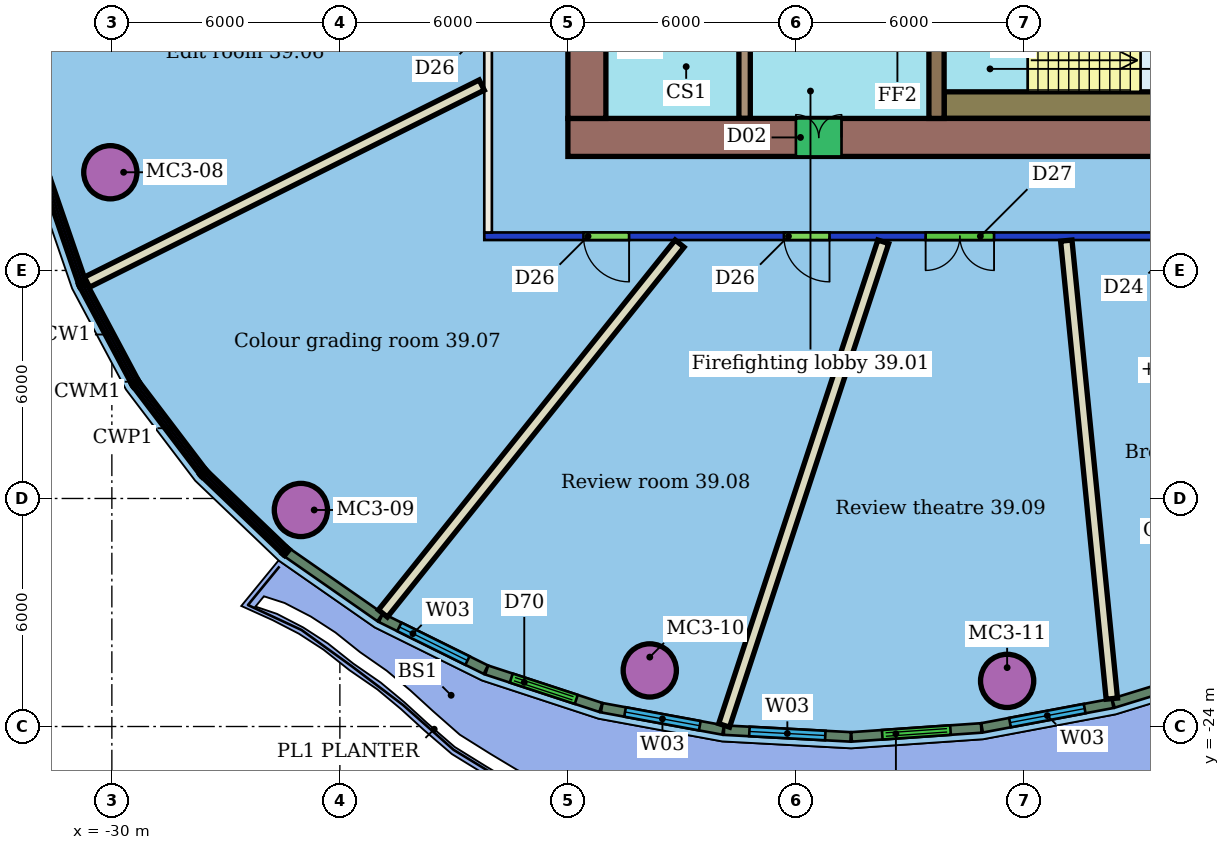
"""IFC4 building model, lengths in metres.
Left out: names, types, materials, properties, quantities, classifications, styles, units other than length and angle.
Written with IfcOpenShell. Run it as: python <this file> out.ifc"""

import sys

from ifc_helpers import new_model, si_unit, direction, frame, frame_2d, origin, origin_2d, place, context, subcontext, project, spatial, rectangle, hollow_circle, extrude, element, fill, save


model = new_model("IFC4")
c1 = context("Model", 3, precision=1e-05, world=origin(), true_north=direction((0.0, 1.0)))
c2 = subcontext(c1, "Body", "Model", "MODEL_VIEW")
j1 = project(units=[si_unit("LENGTHUNIT", "METRE"), si_unit("PLANEANGLEUNIT", "RADIAN")], contexts=[c1])
p1 = place(None, origin())
s1 = spatial("IfcSite", under=j1, at=p1, CompositionType="ELEMENT")
p2 = place(p1, origin())
s2 = spatial("IfcBuilding", under=s1, at=p2, CompositionType="ELEMENT")
p3 = place(p2, frame((0.0, 0.0, 165.0)))
s3 = spatial("IfcBuildingStorey", under=s2, at=p3, CompositionType="ELEMENT", Elevation=165.0)
for number, where, z_axis, x_axis in (
    (1, (-30.041, -9.417, 0.0), (0.0, 0.0, 1.0), (1.0, 0.0, 0.0)),
    (2, (-25.026, -18.303, 0.0), (0.0, 0.0, 1.0), (1.0, 0.0, 0.0)),
    (3, (-15.845, -22.524, 0.0), (0.0, 0.0, 1.0), (1.0, 0.0, 0.0)),
    (4, (-6.442, -22.8, 0.0), (0.0, 0.0, 1.0), (1.0, 0.0, 0.0)),
):
    element("IfcColumn", number, at=place(p3, frame(where, z_axis=z_axis, x_axis=x_axis)), inside=s3, PredefinedType="COLUMN", context=c2, shape_type="SweptSolid", body=[
        extrude(hollow_circle(Radius=0.7, WallThickness=0.05, at=origin_2d()), origin(), (0.0, 0.0, 1.0), 3.45),
    ])
p4 = place(p3, frame((8.2, -11.1, 0.0), z_axis=(0.0, 0.0, 1.0), x_axis=(-1.0, 0.0, 0.0)))
e5 = element("IfcWall", 5, at=p4, inside=s3, PredefinedType="PARTITIONING", context=c2, shape_type="SweptSolid", body=[
    extrude(rectangle(XDim=28.4, YDim=0.2, at=frame_2d((14.2, 0.0))), origin(), (0.0, 0.0, 1.0), 3.05),
])
p5 = place(p4, frame((24.59, 0.0, 0.0)))
e6 = element("IfcOpeningElement", 6, at=p5, cuts=e5, PredefinedType="OPENING", context=c2, shape_type="SweptSolid", body=[
    extrude(rectangle(XDim=1.2, YDim=2.1, at=frame_2d((0.6, 1.05))), frame((0.0, 0.11, 0.0), z_axis=(0.0, -1.0, 0.0), x_axis=(1.0, 0.0, 0.0)), (0.0, 0.0, 1.0), 0.22),
])
p6 = place(p4, frame((19.316, 0.0, 0.0)))
e7 = element("IfcOpeningElement", 7, at=p6, cuts=e5, PredefinedType="OPENING", context=c2, shape_type="SweptSolid", body=[
    extrude(rectangle(XDim=1.2, YDim=2.1, at=frame_2d((0.6, 1.05))), frame((0.0, 0.11, 0.0), z_axis=(0.0, -1.0, 0.0), x_axis=(1.0, 0.0, 0.0)), (0.0, 0.0, 1.0), 0.22),
])
p7 = place(p4, frame((14.986, 0.0, 0.0)))
e8 = element("IfcOpeningElement", 8, at=p7, cuts=e5, PredefinedType="OPENING", context=c2, shape_type="SweptSolid", body=[
    extrude(rectangle(XDim=1.8, YDim=2.4, at=frame_2d((0.9, 1.2))), frame((0.0, 0.11, 0.0), z_axis=(0.0, -1.0, 0.0), x_axis=(1.0, 0.0, 0.0)), (0.0, 0.0, 1.0), 0.22),
])
p8 = place(p4, frame((8.594, 0.0, 0.0)))
e9 = element("IfcOpeningElement", 9, at=p8, cuts=e5, PredefinedType="OPENING", context=c2, shape_type="SweptSolid", body=[
    extrude(rectangle(XDim=1.5, YDim=2.1, at=frame_2d((0.75, 1.05))), frame((0.0, 0.11, 0.0), z_axis=(0.0, -1.0, 0.0), x_axis=(1.0, 0.0, 0.0)), (0.0, 0.0, 1.0), 0.22),
])
p9 = place(p4, frame((4.011, 0.0, 0.0)))
e10 = element("IfcOpeningElement", 10, at=p9, cuts=e5, PredefinedType="OPENING", context=c2, shape_type="SweptSolid", body=[
    extrude(rectangle(XDim=1.2, YDim=2.1, at=frame_2d((0.6, 1.05))), frame((0.0, 0.11, 0.0), z_axis=(0.0, -1.0, 0.0), x_axis=(1.0, 0.0, 0.0)), (0.0, 0.0, 1.0), 0.22),
])
p10 = place(p3, frame((-20.1, -11.0, 0.0), z_axis=(0.0, 0.0, 1.0), x_axis=(0.0, 1.0, 0.0)))
e11 = element("IfcWall", 11, at=p10, inside=s3, PredefinedType="PARTITIONING", context=c2, shape_type="SweptSolid", body=[
    extrude(rectangle(XDim=22.0, YDim=0.2, at=frame_2d((11.0, 0.0))), origin(), (0.0, 0.0, 1.0), 3.45),
])
p11 = place(p10, frame((16.748, 0.0, 0.0)))
e12 = element("IfcOpeningElement", 12, at=p11, cuts=e11, PredefinedType="OPENING", context=c2, shape_type="SweptSolid", body=[
    extrude(rectangle(XDim=1.0, YDim=2.1, at=frame_2d((0.5, 1.05))), frame((0.0, 0.11, 0.0), z_axis=(0.0, -1.0, 0.0), x_axis=(1.0, 0.0, 0.0)), (0.0, 0.0, 1.0), 0.22),
])
p12 = place(p10, frame((11.959, 0.0, 0.0)))
e13 = element("IfcOpeningElement", 13, at=p12, cuts=e11, PredefinedType="OPENING", context=c2, shape_type="SweptSolid", body=[
    extrude(rectangle(XDim=1.1, YDim=2.1, at=frame_2d((0.55, 1.05))), frame((0.0, 0.11, 0.0), z_axis=(0.0, -1.0, 0.0), x_axis=(1.0, 0.0, 0.0)), (0.0, 0.0, 1.0), 0.22),
])
p13 = place(p10, frame((5.319, 0.0, 0.0)))
e14 = element("IfcOpeningElement", 14, at=p13, cuts=e11, PredefinedType="OPENING", context=c2, shape_type="SweptSolid", body=[
    extrude(rectangle(XDim=1.2, YDim=2.1, at=frame_2d((0.6, 1.05))), frame((0.0, 0.11, 0.0), z_axis=(0.0, -1.0, 0.0), x_axis=(1.0, 0.0, 0.0)), (0.0, 0.0, 1.0), 0.22),
])
p14 = place(p3, frame((-30.655, -12.308, 0.0), z_axis=(0.0, 0.0, 1.0), x_axis=(0.894708785018, 0.446649963632, 0.0)))
e15 = element("IfcWall", 15, at=p14, inside=s3, PredefinedType="PARTITIONING", context=c2, shape_type="SweptSolid", body=[
    extrude(rectangle(XDim=11.61, YDim=0.3, at=frame_2d((5.805, 0.0))), origin(), (0.0, 0.0, 1.0), 3.45),
])
p15 = place(p3, frame((-22.868, -21.025, 0.0), z_axis=(0.0, 0.0, 1.0), x_axis=(0.625768349668, 0.780008956713, 0.0)))
e16 = element("IfcWall", 16, at=p15, inside=s3, PredefinedType="PARTITIONING", context=c2, shape_type="SweptSolid", body=[
    extrude(rectangle(XDim=12.476, YDim=0.3, at=frame_2d((6.238, 0.0))), origin(), (0.0, 0.0, 1.0), 3.45),
])
p16 = place(p3, frame((-13.889, -23.97, 0.0), z_axis=(0.0, 0.0, 1.0), x_axis=(0.312622092404, 0.94987758545, 0.0)))
e17 = element("IfcWall", 17, at=p16, inside=s3, PredefinedType="PARTITIONING", context=c2, shape_type="SweptSolid", body=[
    extrude(rectangle(XDim=13.395, YDim=0.3, at=frame_2d((6.697, 0.0))), origin(), (0.0, 0.0, 1.0), 3.45),
])
p17 = place(p3, frame((-3.687, -23.267, 0.0), z_axis=(0.0, 0.0, 1.0), x_axis=(-0.098952866834, 0.995092121437, 0.0)))
e18 = element("IfcWall", 18, at=p17, inside=s3, PredefinedType="PARTITIONING", context=c2, shape_type="SweptSolid", body=[
    extrude(rectangle(XDim=12.112, YDim=0.3, at=frame_2d((6.056, 0.0))), origin(), (0.0, 0.0, 1.0), 3.45),
])
p18 = place(p3, frame((-25.378, -19.429, 0.0), z_axis=(0.0, 0.0, 1.0), x_axis=(0.820566469183, -0.571551108521, 0.0)))
e19 = element("IfcWall", 19, at=p18, inside=s3, PredefinedType="SOLIDWALL", context=c2, shape_type="SweptSolid", body=[
    extrude(rectangle(XDim=2.969, YDim=0.25, at=frame_2d((1.484, 0.0))), origin(), (0.0, 0.0, 1.0), 3.1),
])
p19 = place(p3, frame((-22.919, -21.139, 0.0), z_axis=(0.0, 0.0, 1.0), x_axis=(0.896353964816, -0.443339113725, 0.0)))
e20 = element("IfcWall", 20, at=p19, inside=s3, PredefinedType="SOLIDWALL", context=c2, shape_type="SweptSolid", body=[
    extrude(rectangle(XDim=3.078, YDim=0.25, at=frame_2d((1.539, 0.0))), origin(), (0.0, 0.0, 1.0), 3.1),
])
p20 = place(p19, frame((0.539, 0.0, 0.9)))
e21 = element("IfcOpeningElement", 21, at=p20, cuts=e20, PredefinedType="OPENING", context=c2, shape_type="SweptSolid", body=[
    extrude(rectangle(XDim=2.0, YDim=2.1, at=frame_2d((1.0, 1.05))), frame((0.0, 0.135, 0.0), z_axis=(0.0, -1.0, 0.0), x_axis=(1.0, 0.0, 0.0)), (0.0, 0.0, 1.0), 0.27),
])
p21 = place(p3, frame((-20.136, -22.514, 0.0), z_axis=(0.0, 0.0, 1.0), x_axis=(0.950163900918, -0.311750800147, 0.0)))
e22 = element("IfcWall", 22, at=p21, inside=s3, PredefinedType="SOLIDWALL", context=c2, shape_type="SweptSolid", body=[
    extrude(rectangle(XDim=3.16, YDim=0.25, at=frame_2d((1.58, 0.0))), origin(), (0.0, 0.0, 1.0), 3.1),
])
p22 = place(p21, frame((0.68, 0.0, 0.0)))
e23 = element("IfcOpeningElement", 23, at=p22, cuts=e22, PredefinedType="OPENING", context=c2, shape_type="SweptSolid", body=[
    extrude(rectangle(XDim=1.8, YDim=2.4, at=frame_2d((0.9, 1.2))), frame((0.0, 0.135, 0.0), z_axis=(0.0, -1.0, 0.0), x_axis=(1.0, 0.0, 0.0)), (0.0, 0.0, 1.0), 0.27),
])
p23 = place(p3, frame((-17.11, -23.505, 0.0), z_axis=(0.0, 0.0, 1.0), x_axis=(0.983511988616, -0.180842938067, 0.0)))
e24 = element("IfcWall", 24, at=p23, inside=s3, PredefinedType="SOLIDWALL", context=c2, shape_type="SweptSolid", body=[
    extrude(rectangle(XDim=3.248, YDim=0.25, at=frame_2d((1.624, 0.0))), origin(), (0.0, 0.0, 1.0), 3.1),
])
p24 = place(p23, frame((0.624, 0.0, 0.9)))
e25 = element("IfcOpeningElement", 25, at=p24, cuts=e24, PredefinedType="OPENING", context=c2, shape_type="SweptSolid", body=[
    extrude(rectangle(XDim=2.0, YDim=2.1, at=frame_2d((1.0, 1.05))), frame((0.0, 0.135, 0.0), z_axis=(0.0, -1.0, 0.0), x_axis=(1.0, 0.0, 0.0)), (0.0, 0.0, 1.0), 0.27),
])
p25 = place(p3, frame((-13.891, -24.095, 0.0), z_axis=(0.0, 0.0, 1.0), x_axis=(0.998572595535, -0.053411341936, 0.0)))
e26 = element("IfcWall", 26, at=p25, inside=s3, PredefinedType="SOLIDWALL", context=c2, shape_type="SweptSolid", body=[
    extrude(rectangle(XDim=3.337, YDim=0.25, at=frame_2d((1.668, 0.0))), origin(), (0.0, 0.0, 1.0), 3.1),
])
p26 = place(p25, frame((0.668, 0.0, 0.9)))
e27 = element("IfcOpeningElement", 27, at=p26, cuts=e26, PredefinedType="OPENING", context=c2, shape_type="SweptSolid", body=[
    extrude(rectangle(XDim=2.0, YDim=2.1, at=frame_2d((1.0, 1.05))), frame((0.0, 0.135, 0.0), z_axis=(0.0, -1.0, 0.0), x_axis=(1.0, 0.0, 0.0)), (0.0, 0.0, 1.0), 0.27),
])
p27 = place(p3, frame((-10.536, -24.273, 0.0), z_axis=(0.0, 0.0, 1.0), x_axis=(0.997639779644, 0.068664911499, 0.0)))
e28 = element("IfcWall", 28, at=p27, inside=s3, PredefinedType="SOLIDWALL", context=c2, shape_type="SweptSolid", body=[
    extrude(rectangle(XDim=3.42, YDim=0.25, at=frame_2d((1.71, 0.0))), origin(), (0.0, 0.0, 1.0), 3.1),
])
p28 = place(p27, frame((0.81, 0.0, 0.0)))
e29 = element("IfcOpeningElement", 29, at=p28, cuts=e28, PredefinedType="OPENING", context=c2, shape_type="SweptSolid", body=[
    extrude(rectangle(XDim=1.8, YDim=2.4, at=frame_2d((0.9, 1.2))), frame((0.0, 0.135, 0.0), z_axis=(0.0, -1.0, 0.0), x_axis=(1.0, 0.0, 0.0)), (0.0, 0.0, 1.0), 0.27),
])
p29 = place(p3, frame((-7.101, -24.035, 0.0), z_axis=(0.0, 0.0, 1.0), x_axis=(0.982808840364, 0.184626063442, 0.0)))
e30 = element("IfcWall", 30, at=p29, inside=s3, PredefinedType="SOLIDWALL", context=c2, shape_type="SweptSolid", body=[
    extrude(rectangle(XDim=3.494, YDim=0.25, at=frame_2d((1.747, 0.0))), origin(), (0.0, 0.0, 1.0), 3.1),
])
p30 = place(p29, frame((0.747, 0.0, 0.9)))
e31 = element("IfcOpeningElement", 31, at=p30, cuts=e30, PredefinedType="OPENING", context=c2, shape_type="SweptSolid", body=[
    extrude(rectangle(XDim=2.0, YDim=2.1, at=frame_2d((1.0, 1.05))), frame((0.0, 0.135, 0.0), z_axis=(0.0, -1.0, 0.0), x_axis=(1.0, 0.0, 0.0)), (0.0, 0.0, 1.0), 0.27),
])
p31 = place(p3, frame((-3.646, -23.385, 0.0), z_axis=(0.0, 0.0, 1.0), x_axis=(0.955795559149, 0.294032054565, 0.0)))
e32 = element("IfcWall", 32, at=p31, inside=s3, PredefinedType="SOLIDWALL", context=c2, shape_type="SweptSolid", body=[
    extrude(rectangle(XDim=3.508, YDim=0.25, at=frame_2d((1.754, 0.0))), origin(), (0.0, 0.0, 1.0), 3.1),
])
p32 = place(p3, frame((-18.0, -8.5, 0.0), z_axis=(0.0, 0.0, 1.0), x_axis=(1.0, 0.0, 0.0)))
e33 = element("IfcWall", 33, at=p32, inside=s3, PredefinedType="SHEAR", context=c2, shape_type="SweptSolid", body=[
    extrude(rectangle(XDim=24.0, YDim=1.0, at=frame_2d((12.0, 0.0))), origin(), (0.0, 0.0, 1.0), 3.3),
])
p33 = place(p32, frame((6.0, 0.0, 0.0)))
e34 = element("IfcOpeningElement", 34, at=p33, cuts=e33, PredefinedType="OPENING", context=c2, shape_type="SweptSolid", body=[
    extrude(rectangle(XDim=1.2, YDim=2.1, at=frame_2d((0.6, 1.05))), frame((0.0, 0.51, 0.0), z_axis=(0.0, -1.0, 0.0), x_axis=(1.0, 0.0, 0.0)), (0.0, 0.0, 1.0), 1.02),
])
p34 = place(p3, frame((-17.5, 8.0, 0.0), z_axis=(0.0, 0.0, 1.0), x_axis=(0.0, -1.0, 0.0)))
e35 = element("IfcWall", 35, at=p34, inside=s3, PredefinedType="SHEAR", context=c2, shape_type="SweptSolid", body=[
    extrude(rectangle(XDim=16.0, YDim=1.0, at=frame_2d((8.0, 0.0))), origin(), (0.0, 0.0, 1.0), 3.3),
])
p35 = place(p34, frame((11.9, 0.0, 0.0)))
e36 = element("IfcOpeningElement", 36, at=p35, cuts=e35, PredefinedType="OPENING", context=c2, shape_type="SweptSolid", body=[
    extrude(rectangle(XDim=1.2, YDim=2.1, at=frame_2d((0.6, 1.05))), frame((0.0, 0.51, 0.0), z_axis=(0.0, -1.0, 0.0), x_axis=(1.0, 0.0, 0.0)), (0.0, 0.0, 1.0), 1.02),
])
p36 = place(p34, frame((2.9, 0.0, 0.0)))
e37 = element("IfcOpeningElement", 37, at=p36, cuts=e35, PredefinedType="OPENING", context=c2, shape_type="SweptSolid", body=[
    extrude(rectangle(XDim=1.2, YDim=2.1, at=frame_2d((0.6, 1.05))), frame((0.0, 0.51, 0.0), z_axis=(0.0, -1.0, 0.0), x_axis=(1.0, 0.0, 0.0)), (0.0, 0.0, 1.0), 1.02),
])
p37 = place(p3, frame((-13.35, 8.0, 0.0), z_axis=(0.0, 0.0, 1.0), x_axis=(0.0, -1.0, 0.0)))
e38 = element("IfcWall", 38, at=p37, inside=s3, PredefinedType="SHEAR", context=c2, shape_type="SweptSolid", body=[
    extrude(rectangle(XDim=16.0, YDim=0.3, at=frame_2d((8.0, 0.0))), origin(), (0.0, 0.0, 1.0), 3.3),
])
p38 = place(p37, frame((7.25, 0.0, 0.0)))
e39 = element("IfcOpeningElement", 39, at=p38, cuts=e38, PredefinedType="OPENING", context=c2, shape_type="SweptSolid", body=[
    extrude(rectangle(XDim=1.5, YDim=2.1, at=frame_2d((0.75, 1.05))), frame((0.0, 0.16, 0.0), z_axis=(0.0, -1.0, 0.0), x_axis=(1.0, 0.0, 0.0)), (0.0, 0.0, 1.0), 0.32),
])
p39 = place(p3, frame((-8.3, -3.88, 0.0), z_axis=(0.0, 0.0, 1.0), x_axis=(0.0, -1.0, 0.0)))
e40 = element("IfcWall", 40, at=p39, inside=s3, PredefinedType="SHEAR", context=c2, shape_type="SweptSolid", body=[
    extrude(rectangle(XDim=4.12, YDim=0.4, at=frame_2d((2.06, 0.0))), origin(), (0.0, 0.0, 1.0), 3.3),
])
p40 = place(p39, frame((1.11, 0.0, 0.0)))
e41 = element("IfcOpeningElement", 41, at=p40, cuts=e40, PredefinedType="OPENING", context=c2, shape_type="SweptSolid", body=[
    extrude(rectangle(XDim=1.2, YDim=2.1, at=frame_2d((0.6, 1.05))), frame((0.0, 0.21, 0.0), z_axis=(0.0, -1.0, 0.0), x_axis=(1.0, 0.0, 0.0)), (0.0, 0.0, 1.0), 0.42),
])
p41 = place(p3, frame((-8.1, -7.65, 0.0), z_axis=(0.0, 0.0, 1.0), x_axis=(1.0, 0.0, 0.0)))
e42 = element("IfcWall", 42, at=p41, inside=s3, PredefinedType="SHEAR", context=c2, shape_type="SweptSolid", body=[
    extrude(rectangle(XDim=7.05, YDim=0.7, at=frame_2d((3.525, 0.0))), origin(), (0.0, 0.0, 1.0), 3.3),
])
p42 = place(p5, origin())
e43 = element("IfcDoor", 43, at=p42, inside=s3, OperationType="SINGLE_SWING_LEFT", PredefinedType="DOOR", context=c2, shape_type="SweptSolid", body=[
    extrude(rectangle(XDim=1.2, YDim=2.1, at=frame_2d((0.6, 1.05))), frame((0.0, 0.025, 0.0), z_axis=(0.0, -1.0, 0.0), x_axis=(1.0, 0.0, 0.0)), (0.0, 0.0, 1.0), 0.05),
])
fill(e6, e43)
p43 = place(p6, origin())
e44 = element("IfcDoor", 44, at=p43, inside=s3, OperationType="SINGLE_SWING_LEFT", PredefinedType="DOOR", context=c2, shape_type="SweptSolid", body=[
    extrude(rectangle(XDim=1.2, YDim=2.1, at=frame_2d((0.6, 1.05))), frame((0.0, 0.025, 0.0), z_axis=(0.0, -1.0, 0.0), x_axis=(1.0, 0.0, 0.0)), (0.0, 0.0, 1.0), 0.05),
])
fill(e7, e44)
p44 = place(p7, origin())
e45 = element("IfcDoor", 45, at=p44, inside=s3, OperationType="DOUBLE_DOOR_SINGLE_SWING", PredefinedType="DOOR", context=c2, shape_type="SweptSolid", body=[
    extrude(rectangle(XDim=1.8, YDim=2.4, at=frame_2d((0.9, 1.2))), frame((0.0, 0.025, 0.0), z_axis=(0.0, -1.0, 0.0), x_axis=(1.0, 0.0, 0.0)), (0.0, 0.0, 1.0), 0.05),
])
fill(e8, e45)
p45 = place(p20, origin())
e46 = element("IfcWindow", 46, at=p45, inside=s3, PartitioningType="SINGLE_PANEL", PredefinedType="WINDOW", context=c2, shape_type="SweptSolid", body=[
    extrude(rectangle(XDim=2.0, YDim=2.1, at=frame_2d((1.0, 1.05))), frame((0.0, 0.03, 0.0), z_axis=(0.0, -1.0, 0.0), x_axis=(1.0, 0.0, 0.0)), (0.0, 0.0, 1.0), 0.06),
])
fill(e21, e46)
p46 = place(p22, origin())
e47 = element("IfcDoor", 47, at=p46, inside=s3, OperationType="DOUBLE_DOOR_SLIDING", PredefinedType="DOOR", context=c2, shape_type="SweptSolid", body=[
    extrude(rectangle(XDim=1.8, YDim=2.4, at=frame_2d((0.9, 1.2))), frame((0.0, 0.025, 0.0), z_axis=(0.0, -1.0, 0.0), x_axis=(1.0, 0.0, 0.0)), (0.0, 0.0, 1.0), 0.05),
])
fill(e23, e47)
p47 = place(p24, origin())
e48 = element("IfcWindow", 48, at=p47, inside=s3, PartitioningType="SINGLE_PANEL", PredefinedType="WINDOW", context=c2, shape_type="SweptSolid", body=[
    extrude(rectangle(XDim=2.0, YDim=2.1, at=frame_2d((1.0, 1.05))), frame((0.0, 0.03, 0.0), z_axis=(0.0, -1.0, 0.0), x_axis=(1.0, 0.0, 0.0)), (0.0, 0.0, 1.0), 0.06),
])
fill(e25, e48)
p48 = place(p26, origin())
e49 = element("IfcWindow", 49, at=p48, inside=s3, PartitioningType="SINGLE_PANEL", PredefinedType="WINDOW", context=c2, shape_type="SweptSolid", body=[
    extrude(rectangle(XDim=2.0, YDim=2.1, at=frame_2d((1.0, 1.05))), frame((0.0, 0.03, 0.0), z_axis=(0.0, -1.0, 0.0), x_axis=(1.0, 0.0, 0.0)), (0.0, 0.0, 1.0), 0.06),
])
fill(e27, e49)
p49 = place(p28, origin())
e50 = element("IfcDoor", 50, at=p49, inside=s3, OperationType="DOUBLE_DOOR_SLIDING", PredefinedType="DOOR", context=c2, shape_type="SweptSolid", body=[
    extrude(rectangle(XDim=1.8, YDim=2.4, at=frame_2d((0.9, 1.2))), frame((0.0, 0.025, 0.0), z_axis=(0.0, -1.0, 0.0), x_axis=(1.0, 0.0, 0.0)), (0.0, 0.0, 1.0), 0.05),
])
fill(e29, e50)
p50 = place(p30, origin())
e51 = element("IfcWindow", 51, at=p50, inside=s3, PartitioningType="SINGLE_PANEL", PredefinedType="WINDOW", context=c2, shape_type="SweptSolid", body=[
    extrude(rectangle(XDim=2.0, YDim=2.1, at=frame_2d((1.0, 1.05))), frame((0.0, 0.03, 0.0), z_axis=(0.0, -1.0, 0.0), x_axis=(1.0, 0.0, 0.0)), (0.0, 0.0, 1.0), 0.06),
])
fill(e31, e51)
p51 = place(p33, origin())
e52 = element("IfcDoor", 52, at=p51, inside=s3, OperationType="DOUBLE_DOOR_SINGLE_SWING", PredefinedType="NOTDEFINED", context=c2, shape_type="SweptSolid", body=[
    extrude(rectangle(XDim=1.2, YDim=2.1, at=frame_2d((0.6, 1.05))), frame((0.0, 0.025, 0.0), z_axis=(0.0, -1.0, 0.0), x_axis=(1.0, 0.0, 0.0)), (0.0, 0.0, 1.0), 0.05),
])
fill(e34, e52)
save(model, sys.argv[1])
